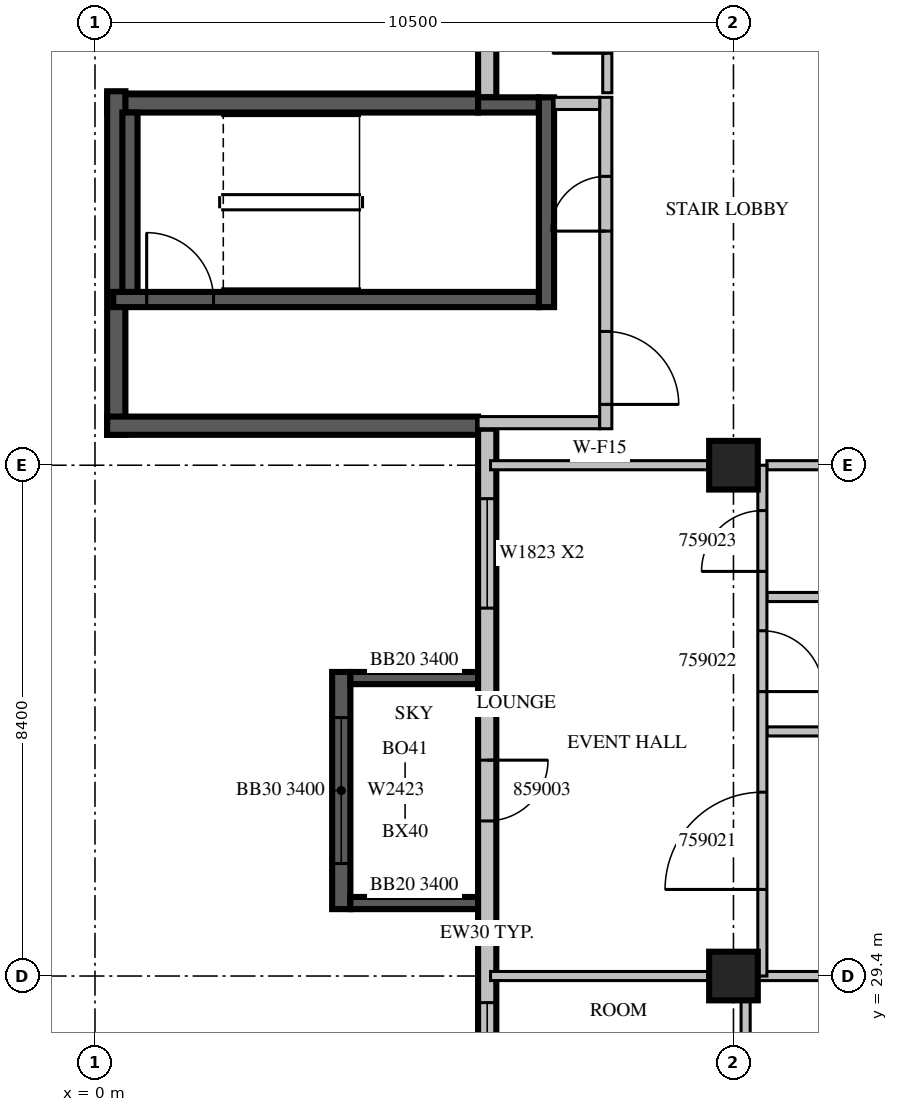
"""IFC4 building model, lengths in metres.
Left out: names, types, materials, properties, quantities, classifications, styles, units other than length and angle.
Written with IfcOpenShell. Run it as: python <this file> out.ifc"""

import sys

from ifc_helpers import new_model, si_unit, direction, frame, frame_2d, origin, origin_2d, place, context, subcontext, project, spatial, rectangle, extrude, source, transform, mapped, element, fill, save


model = new_model("IFC4")
c1 = context("Model", 3, precision=1e-05, world=origin(), true_north=direction((0.0, 1.0)))
c2 = subcontext(c1, "Body", "Model", "MODEL_VIEW")
j1 = project(units=[si_unit("LENGTHUNIT", "METRE"), si_unit("PLANEANGLEUNIT", "RADIAN")], contexts=[c1])
p1 = place(None, origin())
s1 = spatial("IfcSite", under=j1, at=p1, CompositionType="ELEMENT")
p2 = place(p1, origin())
s2 = spatial("IfcBuilding", under=s1, at=p2, CompositionType="ELEMENT")
p3 = place(p2, frame((0.0, 0.0, 257.6)))
s3 = spatial("IfcBuildingStorey", under=s2, at=p3, CompositionType="ELEMENT", Elevation=257.6)
m1 = source(origin(), c2, "Body", "SweptSolid", [
    extrude(rectangle(XDim=0.8, YDim=0.8, at=origin_2d()), origin(), (0.0, 0.0, 1.0), 3.8),
])
for number, where, z_axis, x_axis in (
    (1, (10.5, 29.4, 0.0), (0.0, 0.0, 1.0), (1.0, 0.0, 0.0)),
    (2, (10.5, 37.8, 0.0), (0.0, 0.0, 1.0), (1.0, 0.0, 0.0)),
):
    element("IfcColumn", number, at=place(p3, frame(where, z_axis=z_axis, x_axis=x_axis)), inside=s3, PredefinedType="COLUMN", context=c2, shape_type="MappedRepresentation", body=[
        mapped(m1, transform((0.0, 0.0, 0.0), scale=1.0)),
    ])
m2 = source(origin(), c2, "Body", "SweptSolid", [
    extrude(rectangle(XDim=3.9, YDim=0.3, at=frame_2d((1.95, 0.0))), origin(), (0.0, 0.0, 1.0), 3.4),
])
p4 = place(p3, frame((4.05, 34.4, 0.0), z_axis=(0.0, 0.0, 1.0), x_axis=(0.0, -1.0, 0.0)))
e3 = element("IfcWall", 3, at=p4, inside=s3, PredefinedType="SOLIDWALL", context=c2, shape_type="MappedRepresentation", body=[
    mapped(m2, transform((0.0, 0.0, 0.0), scale=1.0)),
])
m3 = source(origin(), c2, "Body", "SweptSolid", [
    extrude(rectangle(XDim=2.4, YDim=2.3, at=frame_2d((1.2, 1.15))), frame((0.0, 0.16, 0.0), z_axis=(0.0, -1.0, 0.0), x_axis=(1.0, 0.0, 0.0)), (0.0, 0.0, 1.0), 0.32),
])
p5 = place(p4, frame((0.75, 0.0, 0.6)))
e4 = element("IfcOpeningElement", 4, at=p5, cuts=e3, PredefinedType="OPENING", context=c2, shape_type="MappedRepresentation", body=[
    mapped(m3, transform((0.0, 0.0, 0.0), scale=1.0)),
])
m4 = source(origin(), c2, "Body", "SweptSolid", [
    extrude(rectangle(XDim=2.1, YDim=0.2, at=frame_2d((1.05, 0.0))), origin(), (0.0, 0.0, 1.0), 3.4),
])
for number, where, z_axis, x_axis in (
    (5, (6.3, 34.3, 0.0), (0.0, 0.0, 1.0), (-1.0, 0.0, 0.0)),
    (6, (6.3, 30.6, 0.0), (0.0, 0.0, 1.0), (-1.0, 0.0, 0.0)),
):
    element("IfcWall", number, at=place(p3, frame(where, z_axis=z_axis, x_axis=x_axis)), inside=s3, PredefinedType="SOLIDWALL", context=c2, shape_type="MappedRepresentation", body=[
        mapped(m4, transform((0.0, 0.0, 0.0), scale=1.0)),
    ])
m5 = source(origin(), c2, "Body", "SweptSolid", [
    extrude(rectangle(XDim=9.91, YDim=0.3, at=frame_2d((4.955, 0.0))), origin(), (0.0, 0.0, 1.0), 3.4),
])
p6 = place(p3, frame((6.45, 53.76, 0.0), z_axis=(0.0, 0.0, 1.0), x_axis=(0.0, -1.0, 0.0)))
e7 = element("IfcWall", 7, at=p6, inside=s3, PredefinedType="STANDARD", context=c2, shape_type="MappedRepresentation", body=[
    mapped(m5, transform((0.0, 0.0, 0.0), scale=1.0)),
])
m6 = source(origin(), c2, "Body", "SweptSolid", [
    extrude(rectangle(XDim=3.6, YDim=2.3, at=frame_2d((1.8, 1.15))), frame((0.0, 0.16, 0.0), z_axis=(0.0, -1.0, 0.0), x_axis=(1.0, 0.0, 0.0)), (0.0, 0.0, 1.0), 0.32),
])
p7 = place(p6, frame((3.39, 0.0, 0.6)))
e8 = element("IfcOpeningElement", 8, at=p7, cuts=e7, PredefinedType="OPENING", context=c2, shape_type="MappedRepresentation", body=[
    mapped(m6, transform((0.0, 0.0, 0.0), scale=1.0)),
])
p8 = place(p6, frame((0.495, 0.0, 0.6)))
e9 = element("IfcOpeningElement", 9, at=p8, cuts=e7, PredefinedType="OPENING", context=c2, shape_type="MappedRepresentation", body=[
    mapped(m3, transform((0.0, 0.0, 0.0), scale=1.0)),
])
m7 = source(origin(), c2, "Body", "SweptSolid", [
    extrude(rectangle(XDim=6.1, YDim=0.3, at=frame_2d((3.05, 0.0))), origin(), (0.0, 0.0, 1.0), 3.4),
])
p9 = place(p3, frame((6.3, 43.75, 0.0), z_axis=(0.0, 0.0, 1.0), x_axis=(-1.0, 0.0, 0.0)))
e10 = element("IfcWall", 10, at=p9, inside=s3, PredefinedType="SOLIDWALL", context=c2, shape_type="MappedRepresentation", body=[
    mapped(m7, transform((0.0, 0.0, 0.0), scale=1.0)),
])
m8 = source(origin(), c2, "Body", "SweptSolid", [
    extrude(rectangle(XDim=5.65, YDim=0.3, at=frame_2d((2.825, 0.0))), origin(), (0.0, 0.0, 1.0), 3.4),
])
p10 = place(p3, frame((0.35, 43.95, 0.0), z_axis=(0.0, 0.0, 1.0), x_axis=(0.0, -1.0, 0.0)))
e11 = element("IfcWall", 11, at=p10, inside=s3, PredefinedType="SOLIDWALL", context=c2, shape_type="MappedRepresentation", body=[
    mapped(m8, transform((0.0, 0.0, 0.0), scale=1.0)),
])
p11 = place(p3, frame((0.2, 38.45, 0.0), z_axis=(0.0, 0.0, 1.0), x_axis=(1.0, 0.0, 0.0)))
e12 = element("IfcWall", 12, at=p11, inside=s3, PredefinedType="SOLIDWALL", context=c2, shape_type="MappedRepresentation", body=[
    mapped(m7, transform((0.0, 0.0, 0.0), scale=1.0)),
])
m9 = source(origin(), c2, "Body", "SweptSolid", [
    extrude(rectangle(XDim=16.6, YDim=0.3, at=frame_2d((8.3, 0.0))), origin(), (0.0, 0.0, 1.0), 3.4),
])
p12 = place(p3, frame((6.45, 38.4, 0.0), z_axis=(0.0, 0.0, 1.0), x_axis=(0.0, -1.0, 0.0)))
e13 = element("IfcWall", 13, at=p12, inside=s3, PredefinedType="STANDARD", context=c2, shape_type="MappedRepresentation", body=[
    mapped(m9, transform((0.0, 0.0, 0.0), scale=1.0)),
])
m10 = source(origin(), c2, "Body", "SweptSolid", [
    extrude(rectangle(XDim=1.8, YDim=2.3, at=frame_2d((0.9, 1.15))), frame((0.0, 0.16, 0.0), z_axis=(0.0, -1.0, 0.0), x_axis=(1.0, 0.0, 0.0)), (0.0, 0.0, 1.0), 0.32),
])
p13 = place(p12, frame((1.15, 0.0, 0.6)))
e14 = element("IfcOpeningElement", 14, at=p13, cuts=e13, PredefinedType="OPENING", context=c2, shape_type="MappedRepresentation", body=[
    mapped(m10, transform((0.0, 0.0, 0.0), scale=1.0)),
])
p14 = place(p12, frame((9.438, 0.0, 0.6)))
e15 = element("IfcOpeningElement", 15, at=p14, cuts=e13, PredefinedType="OPENING", context=c2, shape_type="MappedRepresentation", body=[
    mapped(m10, transform((0.0, 0.0, 0.0), scale=1.0)),
])
m11 = source(origin(), c2, "Body", "SweptSolid", [
    extrude(rectangle(XDim=3.0, YDim=2.3, at=frame_2d((1.5, 1.15))), frame((0.0, 0.16, 0.0), z_axis=(0.0, -1.0, 0.0), x_axis=(1.0, 0.0, 0.0)), (0.0, 0.0, 1.0), 0.32),
])
p15 = place(p12, frame((12.7, 0.0, 0.6)))
e16 = element("IfcOpeningElement", 16, at=p15, cuts=e13, PredefinedType="OPENING", context=c2, shape_type="MappedRepresentation", body=[
    mapped(m11, transform((0.0, 0.0, 0.0), scale=1.0)),
])
m12 = source(origin(), c2, "Body", "SweptSolid", [
    extrude(rectangle(XDim=1.0, YDim=2.1, at=frame_2d((0.5, 1.05))), frame((0.0, 0.16, 0.0), z_axis=(0.0, -1.0, 0.0), x_axis=(1.0, 0.0, 0.0)), (0.0, 0.0, 1.0), 0.32),
])
p16 = place(p12, frame((5.45, 0.0, 0.0)))
e17 = element("IfcOpeningElement", 17, at=p16, cuts=e13, PredefinedType="OPENING", context=c2, shape_type="MappedRepresentation", body=[
    mapped(m12, transform((0.0, 0.0, 0.0), scale=1.0)),
])
m13 = source(origin(), c2, "Body", "SweptSolid", [
    extrude(rectangle(XDim=7.0, YDim=0.25, at=frame_2d((3.5, 0.0))), origin(), (0.0, 0.0, 1.0), 3.4),
])
p17 = place(p3, frame((0.3, 40.525, 0.0), z_axis=(0.0, 0.0, 1.0), x_axis=(1.0, 0.0, 0.0)))
e18 = element("IfcWall", 18, at=p17, inside=s3, PredefinedType="SOLIDWALL", context=c2, shape_type="MappedRepresentation", body=[
    mapped(m13, transform((0.0, 0.0, 0.0), scale=1.0)),
])
m14 = source(origin(), c2, "Body", "SweptSolid", [
    extrude(rectangle(XDim=1.1, YDim=2.1, at=frame_2d((0.55, 1.05))), frame((0.0, 0.135, 0.0), z_axis=(0.0, -1.0, 0.0), x_axis=(1.0, 0.0, 0.0)), (0.0, 0.0, 1.0), 0.27),
])
p18 = place(p17, frame((0.55, 0.0, 0.0)))
e19 = element("IfcOpeningElement", 19, at=p18, cuts=e18, PredefinedType="OPENING", context=c2, shape_type="MappedRepresentation", body=[
    mapped(m14, transform((0.0, 0.0, 0.0), scale=1.0)),
])
m15 = source(origin(), c2, "Body", "SweptSolid", [
    extrude(rectangle(XDim=1.0, YDim=0.25, at=frame_2d((0.5, 0.0))), origin(), (0.0, 0.0, 1.0), 3.4),
])
p19 = place(p3, frame((6.3, 43.725, 0.0), z_axis=(0.0, 0.0, 1.0), x_axis=(1.0, 0.0, 0.0)))
e20 = element("IfcWall", 20, at=p19, inside=s3, PredefinedType="SOLIDWALL", context=c2, shape_type="MappedRepresentation", body=[
    mapped(m15, transform((0.0, 0.0, 0.0), scale=1.0)),
])
m16 = source(origin(), c2, "Body", "SweptSolid", [
    extrude(rectangle(XDim=3.45, YDim=0.25, at=frame_2d((1.725, 0.0))), origin(), (0.0, 0.0, 1.0), 3.4),
])
p20 = place(p3, frame((7.425, 40.4, 0.0), z_axis=(0.0, 0.0, 1.0), x_axis=(0.0, 1.0, 0.0)))
e21 = element("IfcWall", 21, at=p20, inside=s3, PredefinedType="SOLIDWALL", context=c2, shape_type="MappedRepresentation", body=[
    mapped(m16, transform((0.0, 0.0, 0.0), scale=1.0)),
])
m17 = source(origin(), c2, "Body", "SweptSolid", [
    extrude(rectangle(XDim=2.95, YDim=0.25, at=frame_2d((1.475, 0.0))), origin(), (0.0, 0.0, 1.0), 3.4),
])
p21 = place(p3, frame((0.575, 40.65, 0.0), z_axis=(0.0, 0.0, 1.0), x_axis=(0.0, 1.0, 0.0)))
e22 = element("IfcWall", 22, at=p21, inside=s3, PredefinedType="SOLIDWALL", context=c2, shape_type="MappedRepresentation", body=[
    mapped(m17, transform((0.0, 0.0, 0.0), scale=1.0)),
])
m18 = source(origin(), c2, "Body", "SweptSolid", [
    extrude(rectangle(XDim=2.0, YDim=0.2, at=frame_2d((1.0, 0.0))), origin(), (0.0, 0.0, 1.0), 3.4),
])
p22 = place(p3, frame((6.3, 38.5, 0.0), z_axis=(0.0, 0.0, 1.0), x_axis=(1.0, 0.0, 0.0)))
e23 = element("IfcWall", 23, at=p22, inside=s3, PredefinedType="PARTITIONING", context=c2, shape_type="MappedRepresentation", body=[
    mapped(m18, transform((0.0, 0.0, 0.0), scale=1.0)),
])
m19 = source(origin(), c2, "Body", "SweptSolid", [
    extrude(rectangle(XDim=5.45, YDim=0.2, at=frame_2d((2.725, 0.0))), origin(), (0.0, 0.0, 1.0), 3.4),
])
p23 = place(p3, frame((8.4, 38.4, 0.0), z_axis=(0.0, 0.0, 1.0), x_axis=(0.0, 1.0, 0.0)))
e24 = element("IfcWall", 24, at=p23, inside=s3, PredefinedType="PARTITIONING", context=c2, shape_type="MappedRepresentation", body=[
    mapped(m19, transform((0.0, 0.0, 0.0), scale=1.0)),
])
m20 = source(origin(), c2, "Body", "SweptSolid", [
    extrude(rectangle(XDim=1.2, YDim=2.1, at=frame_2d((0.6, 1.05))), frame((0.0, 0.11, 0.0), z_axis=(0.0, -1.0, 0.0), x_axis=(1.0, 0.0, 0.0)), (0.0, 0.0, 1.0), 0.22),
])
p24 = place(p23, frame((0.4, 0.0, 0.0)))
e25 = element("IfcOpeningElement", 25, at=p24, cuts=e24, PredefinedType="OPENING", context=c2, shape_type="MappedRepresentation", body=[
    mapped(m20, transform((0.0, 0.0, 0.0), scale=1.0)),
])
m21 = source(origin(), c2, "Body", "SweptSolid", [
    extrude(rectangle(XDim=0.9, YDim=2.1, at=frame_2d((0.45, 1.05))), frame((0.0, 0.11, 0.0), z_axis=(0.0, -1.0, 0.0), x_axis=(1.0, 0.0, 0.0)), (0.0, 0.0, 1.0), 0.22),
])
p25 = place(p23, frame((3.25, 0.0, 0.0)))
e26 = element("IfcOpeningElement", 26, at=p25, cuts=e24, PredefinedType="OPENING", context=c2, shape_type="MappedRepresentation", body=[
    mapped(m21, transform((0.0, 0.0, 0.0), scale=1.0)),
])
m22 = source(origin(), c2, "Body", "SweptSolid", [
    extrude(rectangle(XDim=0.75, YDim=0.2, at=frame_2d((0.375, 0.0))), origin(), (0.0, 0.0, 1.0), 3.4),
])
p26 = place(p3, frame((7.55, 43.75, 0.0), z_axis=(0.0, 0.0, 1.0), x_axis=(1.0, 0.0, 0.0)))
e27 = element("IfcWall", 27, at=p26, inside=s3, PredefinedType="PARTITIONING", context=c2, shape_type="MappedRepresentation", body=[
    mapped(m22, transform((0.0, 0.0, 0.0), scale=1.0)),
])
p27 = place(p3, frame((10.7, 26.075, 0.0), z_axis=(0.0, 0.0, 1.0), x_axis=(0.0, 1.0, 0.0)))
e28 = element("IfcWall", 28, at=p27, inside=s3, PredefinedType="PARTITIONING", context=c2, shape_type="SweptSolid", body=[
    extrude(rectangle(XDim=2.926, YDim=0.15, at=frame_2d((1.463, 0.0))), origin(), (0.0, 0.0, 1.0), 3.4),
])
m23 = source(origin(), c2, "Body", "SweptSolid", [
    extrude(rectangle(XDim=3.596, YDim=0.15, at=frame_2d((1.798, 0.0))), origin(), (0.0, 0.0, 1.0), 3.4),
])
p28 = place(p3, frame((10.101, 29.4, 0.0), z_axis=(0.0, 0.0, 1.0), x_axis=(-1.0, 0.0, 0.0)))
e29 = element("IfcWall", 29, at=p28, inside=s3, PredefinedType="PARTITIONING", context=c2, shape_type="MappedRepresentation", body=[
    mapped(m23, transform((0.0, 0.0, 0.0), scale=1.0)),
])
m24 = source(origin(), c2, "Body", "SweptSolid", [
    extrude(rectangle(XDim=4.101, YDim=0.15, at=frame_2d((2.05, 0.0))), origin(), (0.0, 0.0, 1.0), 3.4),
])
p29 = place(p3, frame((15.0, 29.4, 0.0), z_axis=(0.0, 0.0, 1.0), x_axis=(-1.0, 0.0, 0.0)))
e30 = element("IfcWall", 30, at=p29, inside=s3, PredefinedType="PARTITIONING", context=c2, shape_type="MappedRepresentation", body=[
    mapped(m24, transform((0.0, 0.0, 0.0), scale=1.0)),
])
m25 = source(origin(), c2, "Body", "SweptSolid", [
    extrude(rectangle(XDim=2.2, YDim=0.15, at=frame_2d((1.1, 0.0))), origin(), (0.0, 0.0, 1.0), 3.4),
])
p30 = place(p3, frame((8.425, 43.925, 0.0), z_axis=(0.0, 0.0, 1.0), x_axis=(0.0, 1.0, 0.0)))
e31 = element("IfcWall", 31, at=p30, inside=s3, PredefinedType="PARTITIONING", context=c2, shape_type="MappedRepresentation", body=[
    mapped(m25, transform((0.0, 0.0, 0.0), scale=1.0)),
])
m26 = source(origin(), c2, "Body", "SweptSolid", [
    extrude(rectangle(XDim=0.9, YDim=2.1, at=frame_2d((0.45, 1.05))), frame((0.0, 0.085, 0.0), z_axis=(0.0, -1.0, 0.0), x_axis=(1.0, 0.0, 0.0)), (0.0, 0.0, 1.0), 0.17),
])
p31 = place(p30, frame((0.65, 0.0, 0.0)))
e32 = element("IfcOpeningElement", 32, at=p31, cuts=e31, PredefinedType="OPENING", context=c2, shape_type="MappedRepresentation", body=[
    mapped(m26, transform((0.0, 0.0, 0.0), scale=1.0)),
])
m27 = source(origin(), c2, "Body", "SweptSolid", [
    extrude(rectangle(XDim=3.95, YDim=0.15, at=frame_2d((1.975, 0.0))), origin(), (0.0, 0.0, 1.0), 3.4),
])
for number, where, z_axis, x_axis in (
    (33, (15.0, 33.422, 0.0), (0.0, 0.0, 1.0), (-1.0, 0.0, 0.0)),
    (34, (15.0, 35.633, 0.0), (0.0, 0.0, 1.0), (-1.0, 0.0, 0.0)),
):
    element("IfcWall", number, at=place(p3, frame(where, z_axis=z_axis, x_axis=x_axis)), inside=s3, PredefinedType="PARTITIONING", context=c2, shape_type="MappedRepresentation", body=[
        mapped(m27, transform((0.0, 0.0, 0.0), scale=1.0)),
    ])
p32 = place(p3, frame((10.101, 37.8, 0.0), z_axis=(0.0, 0.0, 1.0), x_axis=(-1.0, 0.0, 0.0)))
e35 = element("IfcWall", 35, at=p32, inside=s3, PredefinedType="PARTITIONING", context=c2, shape_type="MappedRepresentation", body=[
    mapped(m23, transform((0.0, 0.0, 0.0), scale=1.0)),
])
p33 = place(p3, frame((15.0, 37.8, 0.0), z_axis=(0.0, 0.0, 1.0), x_axis=(-1.0, 0.0, 0.0)))
e36 = element("IfcWall", 36, at=p33, inside=s3, PredefinedType="PARTITIONING", context=c2, shape_type="MappedRepresentation", body=[
    mapped(m27, transform((0.0, 0.0, 0.0), scale=1.0)),
])
m28 = source(origin(), c2, "Body", "SweptSolid", [
    extrude(rectangle(XDim=8.4, YDim=0.15, at=frame_2d((4.2, 0.0))), origin(), (0.0, 0.0, 1.0), 3.4),
])
p34 = place(p3, frame((10.975, 29.4, 0.0), z_axis=(0.0, 0.0, 1.0), x_axis=(0.0, 1.0, 0.0)))
e37 = element("IfcWall", 37, at=p34, inside=s3, PredefinedType="PARTITIONING", context=c2, shape_type="MappedRepresentation", body=[
    mapped(m28, transform((0.0, 0.0, 0.0), scale=1.0)),
])
m29 = source(origin(), c2, "Body", "SweptSolid", [
    extrude(rectangle(XDim=1.6, YDim=2.1, at=frame_2d((0.8, 1.05))), frame((0.0, 0.085, 0.0), z_axis=(0.0, -1.0, 0.0), x_axis=(1.0, 0.0, 0.0)), (0.0, 0.0, 1.0), 0.17),
])
p35 = place(p34, frame((1.424, 0.0, 0.0)))
e38 = element("IfcOpeningElement", 38, at=p35, cuts=e37, PredefinedType="OPENING", context=c2, shape_type="MappedRepresentation", body=[
    mapped(m29, transform((0.0, 0.0, 0.0), scale=1.0)),
])
m30 = source(origin(), c2, "Body", "SweptSolid", [
    extrude(rectangle(XDim=1.0, YDim=2.1, at=frame_2d((0.5, 1.05))), frame((0.0, 0.085, 0.0), z_axis=(0.0, -1.0, 0.0), x_axis=(1.0, 0.0, 0.0)), (0.0, 0.0, 1.0), 0.17),
])
p36 = place(p34, frame((4.678, 0.0, 0.0)))
e39 = element("IfcOpeningElement", 39, at=p36, cuts=e37, PredefinedType="OPENING", context=c2, shape_type="MappedRepresentation", body=[
    mapped(m30, transform((0.0, 0.0, 0.0), scale=1.0)),
])
p37 = place(p34, frame((6.654, 0.0, 0.0)))
e40 = element("IfcOpeningElement", 40, at=p37, cuts=e37, PredefinedType="OPENING", context=c2, shape_type="MappedRepresentation", body=[
    mapped(m30, transform((0.0, 0.0, 0.0), scale=1.0)),
])
m31 = source(origin(), c2, "Body", "SweptSolid", [
    extrude(rectangle(XDim=2.4, YDim=2.3, at=frame_2d((1.2, 1.15))), frame((0.0, 0.03, 0.0), z_axis=(0.0, -1.0, 0.0), x_axis=(1.0, 0.0, 0.0)), (0.0, 0.0, 1.0), 0.06),
])
p38 = place(p5, origin())
e41 = element("IfcWindow", 41, at=p38, inside=s3, PartitioningType="SINGLE_PANEL", PredefinedType="WINDOW", context=c2, shape_type="MappedRepresentation", body=[
    mapped(m31, transform((0.0, 0.0, 0.0), scale=1.0)),
])
fill(e4, e41)
m32 = source(origin(), c2, "Body", "SweptSolid", [
    extrude(rectangle(XDim=1.8, YDim=2.3, at=frame_2d((0.9, 1.15))), frame((0.0, 0.03, 0.0), z_axis=(0.0, -1.0, 0.0), x_axis=(1.0, 0.0, 0.0)), (0.0, 0.0, 1.0), 0.06),
])
p39 = place(p13, origin())
e42 = element("IfcWindow", 42, at=p39, inside=s3, PartitioningType="SINGLE_PANEL", PredefinedType="WINDOW", context=c2, shape_type="MappedRepresentation", body=[
    mapped(m32, transform((0.0, 0.0, 0.0), scale=1.0)),
])
fill(e14, e42)
p40 = place(p14, origin())
e43 = element("IfcWindow", 43, at=p40, inside=s3, PartitioningType="SINGLE_PANEL", PredefinedType="WINDOW", context=c2, shape_type="MappedRepresentation", body=[
    mapped(m32, transform((0.0, 0.0, 0.0), scale=1.0)),
])
fill(e15, e43)
m33 = source(origin(), c2, "Body", "SweptSolid", [
    extrude(rectangle(XDim=1.1, YDim=2.1, at=frame_2d((0.55, 1.05))), frame((0.0, 0.025, 0.0), z_axis=(0.0, -1.0, 0.0), x_axis=(1.0, 0.0, 0.0)), (0.0, 0.0, 1.0), 0.05),
])
p41 = place(p18, origin())
e44 = element("IfcDoor", 44, at=p41, inside=s3, OperationType="SINGLE_SWING_LEFT", PredefinedType="DOOR", context=c2, shape_type="MappedRepresentation", body=[
    mapped(m33, transform((0.0, 0.0, 0.0), scale=1.0)),
])
fill(e19, e44)
m34 = source(origin(), c2, "Body", "SweptSolid", [
    extrude(rectangle(XDim=1.2, YDim=2.1, at=frame_2d((0.6, 1.05))), frame((0.0, 0.025, 0.0), z_axis=(0.0, -1.0, 0.0), x_axis=(1.0, 0.0, 0.0)), (0.0, 0.0, 1.0), 0.05),
])
p42 = place(p24, origin())
e45 = element("IfcDoor", 45, at=p42, inside=s3, OperationType="SINGLE_SWING_RIGHT", PredefinedType="DOOR", context=c2, shape_type="MappedRepresentation", body=[
    mapped(m34, transform((0.0, 0.0, 0.0), scale=1.0)),
])
fill(e25, e45)
m35 = source(origin(), c2, "Body", "SweptSolid", [
    extrude(rectangle(XDim=0.9, YDim=2.1, at=frame_2d((0.45, 1.05))), frame((0.0, 0.025, 0.0), z_axis=(0.0, -1.0, 0.0), x_axis=(1.0, 0.0, 0.0)), (0.0, 0.0, 1.0), 0.05),
])
p43 = place(p25, origin())
e46 = element("IfcDoor", 46, at=p43, inside=s3, OperationType="SINGLE_SWING_LEFT", PredefinedType="DOOR", context=c2, shape_type="MappedRepresentation", body=[
    mapped(m35, transform((0.0, 0.0, 0.0), scale=1.0)),
])
fill(e26, e46)
p44 = place(p31, origin())
e47 = element("IfcDoor", 47, at=p44, inside=s3, OperationType="SINGLE_SWING_LEFT", PredefinedType="DOOR", context=c2, shape_type="MappedRepresentation", body=[
    mapped(m35, transform((0.0, 0.0, 0.0), scale=1.0)),
])
fill(e32, e47)
m36 = source(origin(), c2, "Body", "SweptSolid", [
    extrude(rectangle(XDim=1.6, YDim=2.1, at=frame_2d((0.8, 1.05))), frame((0.0, 0.025, 0.0), z_axis=(0.0, -1.0, 0.0), x_axis=(1.0, 0.0, 0.0)), (0.0, 0.0, 1.0), 0.05),
])
p45 = place(p35, origin())
e48 = element("IfcDoor", 48, at=p45, inside=s3, OperationType="SINGLE_SWING_LEFT", PredefinedType="DOOR", context=c2, shape_type="MappedRepresentation", body=[
    mapped(m36, transform((0.0, 0.0, 0.0), scale=1.0)),
])
fill(e38, e48)
m37 = source(origin(), c2, "Body", "SweptSolid", [
    extrude(rectangle(XDim=1.0, YDim=2.1, at=frame_2d((0.5, 1.05))), frame((0.0, 0.025, 0.0), z_axis=(0.0, -1.0, 0.0), x_axis=(1.0, 0.0, 0.0)), (0.0, 0.0, 1.0), 0.05),
])
p46 = place(p36, origin())
e49 = element("IfcDoor", 49, at=p46, inside=s3, OperationType="SINGLE_SWING_RIGHT", PredefinedType="DOOR", context=c2, shape_type="MappedRepresentation", body=[
    mapped(m37, transform((0.0, 0.0, 0.0), scale=1.0)),
])
fill(e39, e49)
p47 = place(p37, origin())
e50 = element("IfcDoor", 50, at=p47, inside=s3, OperationType="SINGLE_SWING_LEFT", PredefinedType="DOOR", context=c2, shape_type="MappedRepresentation", body=[
    mapped(m37, transform((0.0, 0.0, 0.0), scale=1.0)),
])
fill(e40, e50)
p48 = place(p16, origin())
e51 = element("IfcDoor", 51, at=p48, inside=s3, OperationType="SINGLE_SWING_LEFT", PredefinedType="DOOR", context=c2, shape_type="MappedRepresentation", body=[
    mapped(m37, transform((0.0, 0.0, 0.0), scale=1.0)),
])
fill(e17, e51)
save(model, sys.argv[1])
